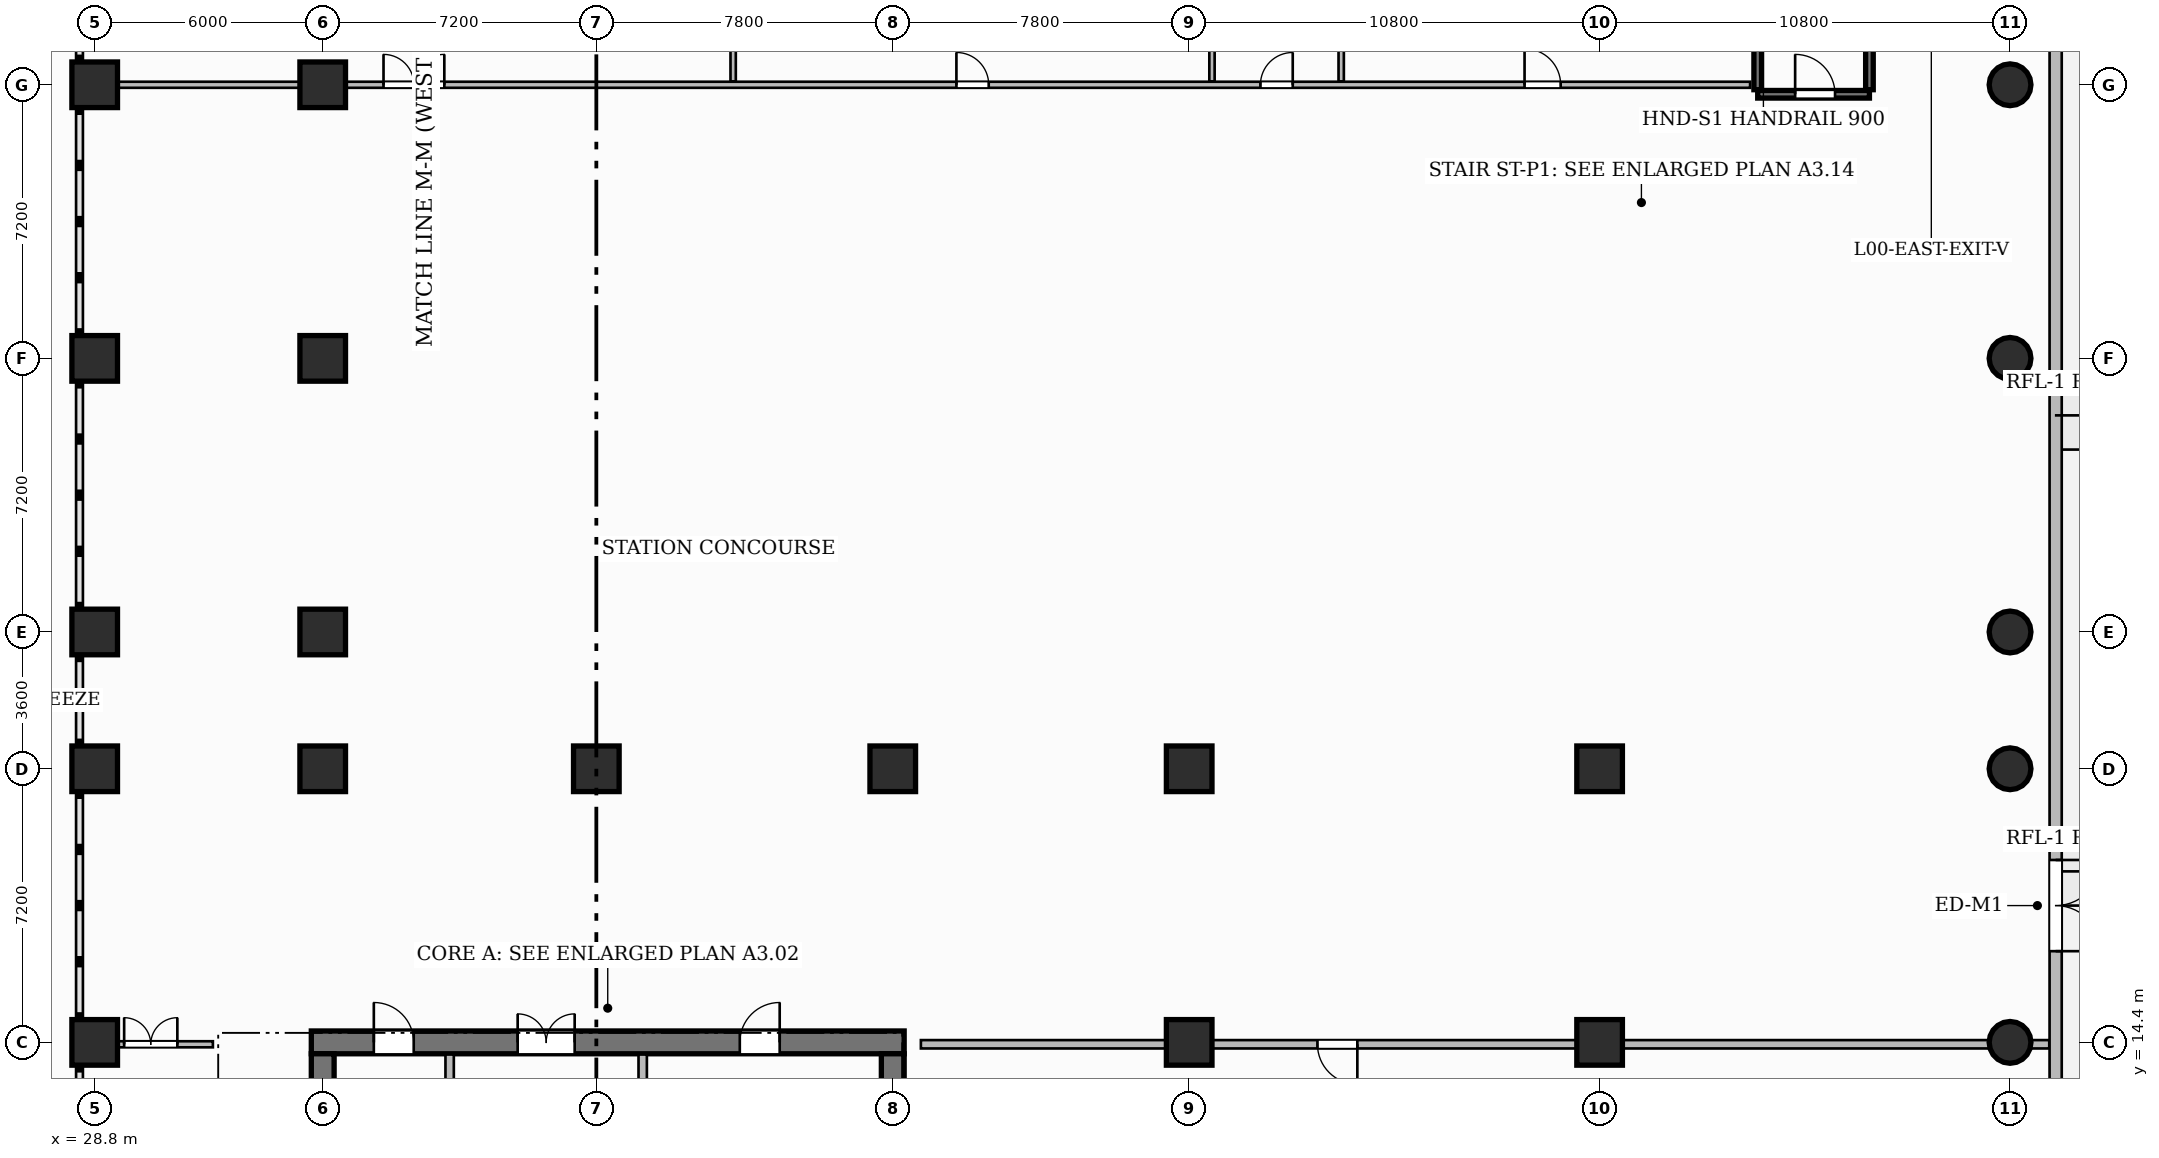
"""IFC4 building model, lengths in metres.
Left out: names, types, materials, properties, quantities, classifications, styles, units other than length and angle.
Written with IfcOpenShell. Run it as: python <this file> out.ifc"""

import sys

from ifc_helpers import new_model, si_unit, direction, frame, frame_2d, origin, origin_2d, place, context, subcontext, project, spatial, rectangle, circle, extrude, source, transform, mapped, element, fill, save


model = new_model("IFC4")
c1 = context("Model", 3, precision=1e-05, world=origin(), true_north=direction((0.0, 1.0)))
c2 = subcontext(c1, "Body", "Model", "MODEL_VIEW")
j1 = project(units=[si_unit("LENGTHUNIT", "METRE"), si_unit("PLANEANGLEUNIT", "RADIAN")], contexts=[c1])
p1 = place(None, origin())
s1 = spatial("IfcSite", under=j1, at=p1, CompositionType="ELEMENT")
p2 = place(p1, origin())
s2 = spatial("IfcBuilding", under=s1, at=p2, CompositionType="ELEMENT")
p3 = place(p2, origin())
s3 = spatial("IfcBuildingStorey", under=s2, at=p3, CompositionType="ELEMENT", Elevation=0.0)
p4 = place(p3, frame((34.5, 14.4, 0.0), z_axis=(0.0, 0.0, 1.0), x_axis=(1.0, 0.0, 0.0)))
e1 = element("IfcWall", 1, at=p4, inside=s3, PredefinedType="SHEAR", context=c2, shape_type="SweptSolid", body=[
    extrude(rectangle(XDim=15.6, YDim=0.6, at=frame_2d((7.8, 0.0))), origin(), (0.0, 0.0, 1.0), 5.4),
])
p5 = place(p4, frame((5.43, 0.0, 0.0)))
e2 = element("IfcOpeningElement", 2, at=p5, cuts=e1, PredefinedType="OPENING", context=c2, shape_type="SweptSolid", body=[
    extrude(rectangle(XDim=1.5, YDim=2.2, at=frame_2d((0.75, 1.1))), frame((0.0, 0.31, 0.0), z_axis=(0.0, -1.0, 0.0), x_axis=(1.0, 0.0, 0.0)), (0.0, 0.0, 1.0), 0.62),
])
p6 = place(p4, frame((1.645, 0.0, 0.0)))
e3 = element("IfcOpeningElement", 3, at=p6, cuts=e1, PredefinedType="OPENING", context=c2, shape_type="SweptSolid", body=[
    extrude(rectangle(XDim=1.05, YDim=2.15, at=frame_2d((0.525, 1.075))), frame((0.0, 0.31, 0.0), z_axis=(0.0, -1.0, 0.0), x_axis=(1.0, 0.0, 0.0)), (0.0, 0.0, 1.0), 0.62),
])
p7 = place(p4, frame((11.275, 0.0, 0.0)))
e4 = element("IfcOpeningElement", 4, at=p7, cuts=e1, PredefinedType="OPENING", context=c2, shape_type="SweptSolid", body=[
    extrude(rectangle(XDim=1.05, YDim=2.15, at=frame_2d((0.525, 1.075))), frame((0.0, 0.31, 0.0), z_axis=(0.0, -1.0, 0.0), x_axis=(1.0, 0.0, 0.0)), (0.0, 0.0, 1.0), 0.62),
])
p8 = place(p3, frame((34.8, 3.9, 0.0), z_axis=(0.0, 0.0, 1.0), x_axis=(0.0, 1.0, 0.0)))
e5 = element("IfcWall", 5, at=p8, inside=s3, PredefinedType="SHEAR", context=c2, shape_type="SweptSolid", body=[
    extrude(rectangle(XDim=10.2, YDim=0.6, at=frame_2d((5.1, 0.0))), origin(), (0.0, 0.0, 1.0), 5.4),
])
p9 = place(p3, frame((49.8, 3.9, 0.0), z_axis=(0.0, 0.0, 1.0), x_axis=(0.0, 1.0, 0.0)))
e6 = element("IfcWall", 6, at=p9, inside=s3, PredefinedType="SHEAR", context=c2, shape_type="SweptSolid", body=[
    extrude(rectangle(XDim=10.2, YDim=0.6, at=frame_2d((5.1, 0.0))), origin(), (0.0, 0.0, 1.0), 5.4),
])
p10 = place(p9, frame((8.225, 0.0, 0.0)))
e7 = element("IfcOpeningElement", 7, at=p10, cuts=e6, PredefinedType="OPENING", context=c2, shape_type="SweptSolid", body=[
    extrude(rectangle(XDim=1.05, YDim=2.2, at=frame_2d((0.525, 1.1))), frame((0.0, 0.31, 0.0), z_axis=(0.0, -1.0, 0.0), x_axis=(1.0, 0.0, 0.0)), (0.0, 0.0, 1.0), 0.62),
])
m1 = source(origin(), c2, "Body", "SweptSolid", [
    extrude(rectangle(XDim=1.2, YDim=1.2, at=origin_2d()), origin(), (0.0, 0.0, 1.0), 5.4),
])
for number, where, z_axis, x_axis in (
    (8, (28.8, 14.4, 0.0), (0.0, 0.0, 1.0), (1.0, 0.0, 0.0)),
    (9, (28.8, 21.6, 0.0), (0.0, 0.0, 1.0), (1.0, 0.0, 0.0)),
    (10, (28.8, 25.2, 0.0), (0.0, 0.0, 1.0), (1.0, 0.0, 0.0)),
    (11, (28.8, 32.4, 0.0), (0.0, 0.0, 1.0), (1.0, 0.0, 0.0)),
    (12, (28.8, 39.6, 0.0), (0.0, 0.0, 1.0), (1.0, 0.0, 0.0)),
    (13, (34.8, 21.6, 0.0), (0.0, 0.0, 1.0), (1.0, 0.0, 0.0)),
    (14, (34.8, 25.2, 0.0), (0.0, 0.0, 1.0), (1.0, 0.0, 0.0)),
    (15, (34.8, 32.4, 0.0), (0.0, 0.0, 1.0), (1.0, 0.0, 0.0)),
    (16, (34.8, 39.6, 0.0), (0.0, 0.0, 1.0), (1.0, 0.0, 0.0)),
    (17, (42.0, 21.6, 0.0), (0.0, 0.0, 1.0), (1.0, 0.0, 0.0)),
    (18, (49.8, 21.6, 0.0), (0.0, 0.0, 1.0), (1.0, 0.0, 0.0)),
    (19, (57.6, 14.4, 0.0), (0.0, 0.0, 1.0), (1.0, 0.0, 0.0)),
    (20, (57.6, 21.6, 0.0), (0.0, 0.0, 1.0), (1.0, 0.0, 0.0)),
    (21, (68.4, 14.4, 0.0), (0.0, 0.0, 1.0), (1.0, 0.0, 0.0)),
    (22, (68.4, 21.6, 0.0), (0.0, 0.0, 1.0), (1.0, 0.0, 0.0)),
):
    element("IfcColumn", number, at=place(p3, frame(where, z_axis=z_axis, x_axis=x_axis)), inside=s3, PredefinedType="COLUMN", context=c2, shape_type="MappedRepresentation", body=[
        mapped(m1, transform((0.0, 0.0, 0.0), scale=1.0)),
    ])
m2 = source(origin(), c2, "Body", "SweptSolid", [
    extrude(circle(Radius=0.55, at=origin_2d()), origin(), (0.0, 0.0, 1.0), 5.4),
])
for number, where, z_axis, x_axis in (
    (23, (79.2, 14.4, 0.0), (0.0, 0.0, 1.0), (1.0, 0.0, 0.0)),
    (24, (79.2, 21.6, 0.0), (0.0, 0.0, 1.0), (1.0, 0.0, 0.0)),
    (25, (79.2, 25.2, 0.0), (0.0, 0.0, 1.0), (1.0, 0.0, 0.0)),
    (26, (79.2, 32.4, 0.0), (0.0, 0.0, 1.0), (1.0, 0.0, 0.0)),
    (27, (79.2, 39.6, 0.0), (0.0, 0.0, 1.0), (1.0, 0.0, 0.0)),
):
    element("IfcColumn", number, at=place(p3, frame(where, z_axis=z_axis, x_axis=x_axis)), inside=s3, PredefinedType="COLUMN", context=c2, shape_type="MappedRepresentation", body=[
        mapped(m2, transform((0.0, 0.0, 0.0), scale=1.0)),
    ])
p11 = place(p3, frame((38.14, 11.22, 0.0), z_axis=(0.0, 0.0, 1.0), x_axis=(0.0, 1.0, 0.0)))
e28 = element("IfcWall", 28, at=p11, inside=s3, PredefinedType="PARTITIONING", context=c2, shape_type="SweptSolid", body=[
    extrude(rectangle(XDim=2.86, YDim=0.22, at=frame_2d((1.43, 0.0))), origin(), (0.0, 0.0, 1.0), 5.1),
])
p12 = place(p11, frame((0.905, 0.0, 0.0)))
e29 = element("IfcOpeningElement", 29, at=p12, cuts=e28, PredefinedType="OPENING", context=c2, shape_type="SweptSolid", body=[
    extrude(rectangle(XDim=1.05, YDim=2.15, at=frame_2d((0.525, 1.075))), frame((0.0, 0.12, 0.0), z_axis=(0.0, -1.0, 0.0), x_axis=(1.0, 0.0, 0.0)), (0.0, 0.0, 1.0), 0.24),
])
p13 = place(p3, frame((43.22, 11.22, 0.0), z_axis=(0.0, 0.0, 1.0), x_axis=(0.0, 1.0, 0.0)))
e30 = element("IfcWall", 30, at=p13, inside=s3, PredefinedType="PARTITIONING", context=c2, shape_type="SweptSolid", body=[
    extrude(rectangle(XDim=2.86, YDim=0.22, at=frame_2d((1.43, 0.0))), origin(), (0.0, 0.0, 1.0), 5.1),
])
p14 = place(p13, frame((0.905, 0.0, 0.0)))
e31 = element("IfcOpeningElement", 31, at=p14, cuts=e30, PredefinedType="OPENING", context=c2, shape_type="SweptSolid", body=[
    extrude(rectangle(XDim=1.05, YDim=2.15, at=frame_2d((0.525, 1.075))), frame((0.0, 0.12, 0.0), z_axis=(0.0, -1.0, 0.0), x_axis=(1.0, 0.0, 0.0)), (0.0, 0.0, 1.0), 0.24),
])
for number, where, z_axis, x_axis in (
    (32, (72.56, 39.47, 0.0), (0.0, 0.0, 1.0), (0.0, 1.0, 0.0)),
    (33, (75.5, 39.47, 0.0), (0.0, 0.0, 1.0), (0.0, 1.0, 0.0)),
):
    element("IfcWall", number, at=place(p3, frame(where, z_axis=z_axis, x_axis=x_axis)), inside=s3, PredefinedType="SHEAR", context=c2, shape_type="SweptSolid", body=[
        extrude(rectangle(XDim=6.91, YDim=0.2, at=frame_2d((3.455, 0.0))), origin(), (0.0, 0.0, 1.0), 5.4),
    ])
p15 = place(p3, frame((72.56, 39.35, 0.0), z_axis=(0.0, 0.0, 1.0), x_axis=(1.0, 0.0, 0.0)))
e34 = element("IfcWall", 34, at=p15, inside=s3, PredefinedType="SHEAR", context=c2, shape_type="SweptSolid", body=[
    extrude(rectangle(XDim=2.94, YDim=0.2, at=frame_2d((1.47, 0.0))), origin(), (0.0, 0.0, 1.0), 5.4),
])
p16 = place(p15, frame((0.985, 0.0, 0.0)))
e35 = element("IfcOpeningElement", 35, at=p16, cuts=e34, PredefinedType="OPENING", context=c2, shape_type="SweptSolid", body=[
    extrude(rectangle(XDim=1.05, YDim=2.2, at=frame_2d((0.525, 1.1))), frame((0.0, 0.11, 0.0), z_axis=(0.0, -1.0, 0.0), x_axis=(1.0, 0.0, 0.0)), (0.0, 0.0, 1.0), 0.22),
])
p17 = place(p3, frame((50.54, 14.35, 0.0), z_axis=(0.0, 0.0, 1.0), x_axis=(1.0, 0.0, 0.0)))
e36 = element("IfcWall", 36, at=p17, inside=s3, PredefinedType="PARTITIONING", context=c2, shape_type="SweptSolid", body=[
    extrude(rectangle(XDim=29.692, YDim=0.22, at=frame_2d((14.846, 0.0))), origin(), (0.0, 0.0, 1.0), 4.085),
])
p18 = place(p17, frame((10.435, 0.0, 0.0)))
e37 = element("IfcOpeningElement", 37, at=p18, cuts=e36, PredefinedType="OPENING", context=c2, shape_type="SweptSolid", body=[
    extrude(rectangle(XDim=1.05, YDim=2.15, at=frame_2d((0.525, 1.075))), frame((0.0, 0.12, 0.0), z_axis=(0.0, -1.0, 0.0), x_axis=(1.0, 0.0, 0.0)), (0.0, 0.0, 1.0), 0.24),
])
p19 = place(p3, frame((28.64, 14.35, 0.0), z_axis=(0.0, 0.0, 1.0), x_axis=(1.0, 0.0, 0.0)))
e38 = element("IfcWall", 38, at=p19, inside=s3, PredefinedType="PARTITIONING", context=c2, shape_type="SweptSolid", body=[
    extrude(rectangle(XDim=3.27, YDim=0.16, at=frame_2d((1.635, 0.0))), origin(), (0.0, 0.0, 1.0), 4.085),
])
p20 = place(p19, frame((0.935, 0.0, 0.0)))
e39 = element("IfcOpeningElement", 39, at=p20, cuts=e38, PredefinedType="OPENING", context=c2, shape_type="SweptSolid", body=[
    extrude(rectangle(XDim=1.4, YDim=2.35, at=frame_2d((0.7, 1.175))), frame((0.0, 0.09, 0.0), z_axis=(0.0, -1.0, 0.0), x_axis=(1.0, 0.0, 0.0)), (0.0, 0.0, 1.0), 0.18),
])
p21 = place(p3, frame((28.64, 39.6, 0.0), z_axis=(0.0, 0.0, 1.0), x_axis=(1.0, 0.0, 0.0)))
e40 = element("IfcWall", 40, at=p21, inside=s3, PredefinedType="PARTITIONING", context=c2, shape_type="SweptSolid", body=[
    extrude(rectangle(XDim=43.72, YDim=0.16, at=frame_2d((21.86, 0.0))), origin(), (0.0, 0.0, 1.0), 4.085),
])
p22 = place(p21, frame((7.76, 0.0, 0.0)))
e41 = element("IfcOpeningElement", 41, at=p22, cuts=e40, PredefinedType="OPENING", context=c2, shape_type="SweptSolid", body=[
    extrude(rectangle(XDim=1.6, YDim=2.4, at=frame_2d((0.8, 1.2))), frame((0.0, 0.09, 0.0), z_axis=(0.0, -1.0, 0.0), x_axis=(1.0, 0.0, 0.0)), (0.0, 0.0, 1.0), 0.18),
])
p23 = place(p21, frame((22.835, 0.0, 0.0)))
e42 = element("IfcOpeningElement", 42, at=p23, cuts=e40, PredefinedType="OPENING", context=c2, shape_type="SweptSolid", body=[
    extrude(rectangle(XDim=0.85, YDim=2.1, at=frame_2d((0.425, 1.05))), frame((0.0, 0.09, 0.0), z_axis=(0.0, -1.0, 0.0), x_axis=(1.0, 0.0, 0.0)), (0.0, 0.0, 1.0), 0.18),
])
p24 = place(p21, frame((30.835, 0.0, 0.0)))
e43 = element("IfcOpeningElement", 43, at=p24, cuts=e40, PredefinedType="OPENING", context=c2, shape_type="SweptSolid", body=[
    extrude(rectangle(XDim=0.85, YDim=2.1, at=frame_2d((0.425, 1.05))), frame((0.0, 0.09, 0.0), z_axis=(0.0, -1.0, 0.0), x_axis=(1.0, 0.0, 0.0)), (0.0, 0.0, 1.0), 0.18),
])
p25 = place(p21, frame((37.785, 0.0, 0.0)))
e44 = element("IfcOpeningElement", 44, at=p25, cuts=e40, PredefinedType="OPENING", context=c2, shape_type="SweptSolid", body=[
    extrude(rectangle(XDim=0.95, YDim=2.15, at=frame_2d((0.475, 1.075))), frame((0.0, 0.09, 0.0), z_axis=(0.0, -1.0, 0.0), x_axis=(1.0, 0.0, 0.0)), (0.0, 0.0, 1.0), 0.18),
])
p26 = place(p3, frame((45.6, 39.69, 0.0), z_axis=(0.0, 0.0, 1.0), x_axis=(0.0, 1.0, 0.0)))
e45 = element("IfcWall", 45, at=p26, inside=s3, PredefinedType="PARTITIONING", context=c2, shape_type="SweptSolid", body=[
    extrude(rectangle(XDim=7.082, YDim=0.14, at=frame_2d((3.541, 0.0))), origin(), (0.0, 0.0, 1.0), 5.1),
])
for number, where, z_axis, x_axis in (
    (46, (58.2, 39.69, 0.0), (0.0, 0.0, 1.0), (0.0, 1.0, 0.0)),
    (47, (61.6, 39.69, 0.0), (0.0, 0.0, 1.0), (0.0, 1.0, 0.0)),
):
    element("IfcWall", number, at=place(p3, frame(where, z_axis=z_axis, x_axis=x_axis)), inside=s3, PredefinedType="PARTITIONING", context=c2, shape_type="SweptSolid", body=[
        extrude(rectangle(XDim=6.942, YDim=0.14, at=frame_2d((3.471, 0.0))), origin(), (0.0, 0.0, 1.0), 5.1),
    ])
p27 = place(p3, frame((80.4, 0.05, 0.0), z_axis=(0.0, 0.0, 1.0), x_axis=(0.0, 1.0, 0.0)))
e48 = element("IfcWall", 48, at=p27, inside=s3, PredefinedType="SOLIDWALL", context=c2, shape_type="SweptSolid", body=[
    extrude(rectangle(XDim=46.7, YDim=0.32, at=frame_2d((23.35, 0.0))), origin(), (0.0, 0.0, 1.0), 5.1),
])
p28 = place(p27, frame((11.5, 0.0, 0.0)))
e49 = element("IfcOpeningElement", 49, at=p28, cuts=e48, PredefinedType="OPENING", context=c2, shape_type="SweptSolid", body=[
    extrude(rectangle(XDim=1.8, YDim=2.4, at=frame_2d((0.9, 1.2))), frame((0.0, 0.17, 0.0), z_axis=(0.0, -1.0, 0.0), x_axis=(1.0, 0.0, 0.0)), (0.0, 0.0, 1.0), 0.34),
])
p29 = place(p27, frame((16.75, 0.0, 0.0)))
e50 = element("IfcOpeningElement", 50, at=p29, cuts=e48, PredefinedType="OPENING", context=c2, shape_type="SweptSolid", body=[
    extrude(rectangle(XDim=2.4, YDim=2.8, at=frame_2d((1.2, 1.4))), frame((0.0, 0.17, 0.0), z_axis=(0.0, -1.0, 0.0), x_axis=(1.0, 0.0, 0.0)), (0.0, 0.0, 1.0), 0.34),
])
p30 = place(p27, frame((42.25, 0.0, 0.0)))
e51 = element("IfcOpeningElement", 51, at=p30, cuts=e48, PredefinedType="OPENING", context=c2, shape_type="SweptSolid", body=[
    extrude(rectangle(XDim=1.8, YDim=2.4, at=frame_2d((0.9, 1.2))), frame((0.0, 0.17, 0.0), z_axis=(0.0, -1.0, 0.0), x_axis=(1.0, 0.0, 0.0)), (0.0, 0.0, 1.0), 0.34),
])
m3 = source(origin(), c2, "Body", "SweptSolid", [
    extrude(rectangle(XDim=1.5, YDim=2.2, at=frame_2d((0.75, 1.1))), frame((0.0, 0.025, 0.0), z_axis=(0.0, -1.0, 0.0), x_axis=(1.0, 0.0, 0.0)), (0.0, 0.0, 1.0), 0.05),
])
p31 = place(p5, origin())
e52 = element("IfcDoor", 52, at=p31, inside=s3, OperationType="DOUBLE_DOOR_SINGLE_SWING", PredefinedType="DOOR", context=c2, shape_type="MappedRepresentation", body=[
    mapped(m3, transform((0.0, 0.0, 0.0), scale=1.0)),
])
fill(e2, e52)
m4 = source(origin(), c2, "Body", "SweptSolid", [
    extrude(rectangle(XDim=1.05, YDim=2.15, at=frame_2d((0.525, 1.075))), frame((0.0, 0.025, 0.0), z_axis=(0.0, -1.0, 0.0), x_axis=(1.0, 0.0, 0.0)), (0.0, 0.0, 1.0), 0.05),
])
p32 = place(p6, origin())
e53 = element("IfcDoor", 53, at=p32, inside=s3, OperationType="SINGLE_SWING_LEFT", PredefinedType="DOOR", context=c2, shape_type="MappedRepresentation", body=[
    mapped(m4, transform((0.0, 0.0, 0.0), scale=1.0)),
])
fill(e3, e53)
p33 = place(p7, origin())
e54 = element("IfcDoor", 54, at=p33, inside=s3, OperationType="SINGLE_SWING_RIGHT", PredefinedType="DOOR", context=c2, shape_type="MappedRepresentation", body=[
    mapped(m4, transform((0.0, 0.0, 0.0), scale=1.0)),
])
fill(e4, e54)
m5 = source(origin(), c2, "Body", "SweptSolid", [
    extrude(rectangle(XDim=1.05, YDim=2.2, at=frame_2d((0.525, 1.1))), frame((0.0, 0.025, 0.0), z_axis=(0.0, -1.0, 0.0), x_axis=(1.0, 0.0, 0.0)), (0.0, 0.0, 1.0), 0.05),
])
p34 = place(p16, origin())
e55 = element("IfcDoor", 55, at=p34, inside=s3, OperationType="SINGLE_SWING_LEFT", PredefinedType="DOOR", context=c2, shape_type="MappedRepresentation", body=[
    mapped(m5, transform((0.0, 0.0, 0.0), scale=1.0)),
])
fill(e35, e55)
p35 = place(p18, frame((1.05, 0.0, 0.0), z_axis=(0.0, 0.0, 1.0), x_axis=(-1.0, 0.0, 0.0)))
e56 = element("IfcDoor", 56, at=p35, inside=s3, OperationType="SINGLE_SWING_RIGHT", PredefinedType="DOOR", context=c2, shape_type="MappedRepresentation", body=[
    mapped(m4, transform((0.0, 0.0, 0.0), scale=1.0)),
])
fill(e37, e56)
m6 = source(origin(), c2, "Body", "SweptSolid", [
    extrude(rectangle(XDim=1.4, YDim=2.35, at=frame_2d((0.7, 1.175))), frame((0.0, 0.025, 0.0), z_axis=(0.0, -1.0, 0.0), x_axis=(1.0, 0.0, 0.0)), (0.0, 0.0, 1.0), 0.05),
])
p36 = place(p20, origin())
e57 = element("IfcDoor", 57, at=p36, inside=s3, OperationType="DOUBLE_DOOR_SINGLE_SWING", PredefinedType="DOOR", context=c2, shape_type="MappedRepresentation", body=[
    mapped(m6, transform((0.0, 0.0, 0.0), scale=1.0)),
])
fill(e39, e57)
m7 = source(origin(), c2, "Body", "SweptSolid", [
    extrude(rectangle(XDim=1.6, YDim=2.4, at=frame_2d((0.8, 1.2))), frame((0.0, 0.025, 0.0), z_axis=(0.0, -1.0, 0.0), x_axis=(1.0, 0.0, 0.0)), (0.0, 0.0, 1.0), 0.05),
])
p37 = place(p22, origin())
e58 = element("IfcDoor", 58, at=p37, inside=s3, OperationType="DOUBLE_DOOR_SINGLE_SWING", PredefinedType="DOOR", context=c2, shape_type="MappedRepresentation", body=[
    mapped(m7, transform((0.0, 0.0, 0.0), scale=1.0)),
])
fill(e41, e58)
m8 = source(origin(), c2, "Body", "SweptSolid", [
    extrude(rectangle(XDim=0.85, YDim=2.1, at=frame_2d((0.425, 1.05))), frame((0.0, 0.025, 0.0), z_axis=(0.0, -1.0, 0.0), x_axis=(1.0, 0.0, 0.0)), (0.0, 0.0, 1.0), 0.05),
])
p38 = place(p23, origin())
e59 = element("IfcDoor", 59, at=p38, inside=s3, OperationType="SINGLE_SWING_LEFT", PredefinedType="DOOR", context=c2, shape_type="MappedRepresentation", body=[
    mapped(m8, transform((0.0, 0.0, 0.0), scale=1.0)),
])
fill(e42, e59)
p39 = place(p24, origin())
e60 = element("IfcDoor", 60, at=p39, inside=s3, OperationType="SINGLE_SWING_RIGHT", PredefinedType="DOOR", context=c2, shape_type="MappedRepresentation", body=[
    mapped(m8, transform((0.0, 0.0, 0.0), scale=1.0)),
])
fill(e43, e60)
m9 = source(origin(), c2, "Body", "SweptSolid", [
    extrude(rectangle(XDim=0.95, YDim=2.15, at=frame_2d((0.475, 1.075))), frame((0.0, 0.025, 0.0), z_axis=(0.0, -1.0, 0.0), x_axis=(1.0, 0.0, 0.0)), (0.0, 0.0, 1.0), 0.05),
])
p40 = place(p25, origin())
e61 = element("IfcDoor", 61, at=p40, inside=s3, OperationType="SINGLE_SWING_LEFT", PredefinedType="DOOR", context=c2, shape_type="MappedRepresentation", body=[
    mapped(m9, transform((0.0, 0.0, 0.0), scale=1.0)),
])
fill(e44, e61)
m10 = source(origin(), c2, "Body", "SweptSolid", [
    extrude(rectangle(XDim=2.4, YDim=2.8, at=frame_2d((1.2, 1.4))), frame((0.0, 0.025, 0.0), z_axis=(0.0, -1.0, 0.0), x_axis=(1.0, 0.0, 0.0)), (0.0, 0.0, 1.0), 0.05),
])
p41 = place(p29, frame((2.4, 0.0, 0.0), z_axis=(0.0, 0.0, 1.0), x_axis=(-1.0, 0.0, 0.0)))
e62 = element("IfcDoor", 62, at=p41, inside=s3, OperationType="DOUBLE_DOOR_SINGLE_SWING", PredefinedType="DOOR", context=c2, shape_type="MappedRepresentation", body=[
    mapped(m10, transform((0.0, 0.0, 0.0), scale=1.0)),
])
fill(e50, e62)
save(model, sys.argv[1])
